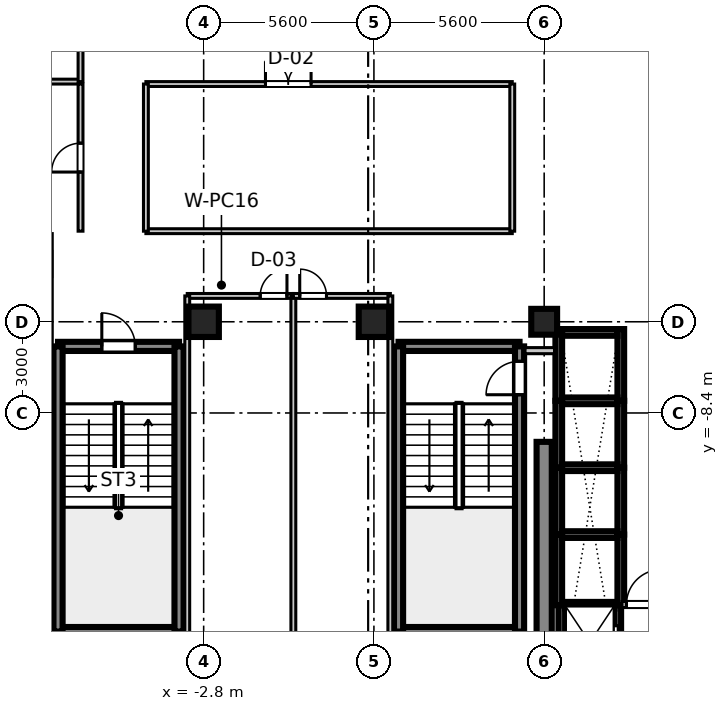
"""IFC4 building model, lengths in metres.
Left out: names, types, materials, properties, quantities, classifications, styles, units other than length and angle.
Written with IfcOpenShell. Run it as: python <this file> out.ifc"""

import sys

from ifc_helpers import new_model, si_unit, direction, frame, frame_2d, origin, origin_2d, place, context, subcontext, project, spatial, rectangle, extrude, source, transform, mapped, element, fill, save


model = new_model("IFC4")
c1 = context("Model", 3, precision=1e-05, world=origin(), true_north=direction((0.0, 1.0)))
c2 = subcontext(c1, "Body", "Model", "MODEL_VIEW")
j1 = project(units=[si_unit("LENGTHUNIT", "METRE"), si_unit("PLANEANGLEUNIT", "RADIAN")], contexts=[c1])
p1 = place(None, origin())
s1 = spatial("IfcSite", under=j1, at=p1, CompositionType="ELEMENT")
p2 = place(p1, origin())
s2 = spatial("IfcBuilding", under=s1, at=p2, CompositionType="ELEMENT")
p3 = place(p2, frame((0.0, 0.0, 249.3)))
s3 = spatial("IfcBuildingStorey", under=s2, at=p3, CompositionType="ELEMENT", Elevation=249.3)
m1 = source(origin(), c2, "Body", "SweptSolid", [
    extrude(rectangle(XDim=1.0, YDim=1.0, at=origin_2d()), origin(), (0.0, 0.0, 1.0), 3.655),
])
for number, where, z_axis, x_axis in (
    (1, (-2.8, -5.4, 0.0), (0.0, 0.0, 1.0), (1.0, 0.0, 0.0)),
    (2, (2.8, -5.4, 0.0), (0.0, 0.0, 1.0), (1.0, 0.0, 0.0)),
):
    element("IfcColumn", number, at=place(p3, frame(where, z_axis=z_axis, x_axis=x_axis)), inside=s3, PredefinedType="COLUMN", context=c2, shape_type="MappedRepresentation", body=[
        mapped(m1, transform((0.0, 0.0, 0.0), scale=1.0)),
    ])
m2 = source(origin(), c2, "Body", "SweptSolid", [
    extrude(rectangle(XDim=0.85, YDim=0.85, at=origin_2d()), origin(), (0.0, 0.0, 1.0), 3.655),
])
p4 = place(p3, frame((8.4, -5.4, 0.0), z_axis=(0.0, 0.0, 1.0), x_axis=(1.0, 0.0, 0.0)))
e3 = element("IfcColumn", 3, at=p4, inside=s3, PredefinedType="PILASTER", context=c2, shape_type="MappedRepresentation", body=[
    mapped(m2, transform((0.0, 0.0, 0.0), scale=1.0)),
])
m3 = source(origin(), c2, "Body", "SweptSolid", [
    extrude(rectangle(XDim=7.65, YDim=0.5, at=frame_2d((3.825, 0.0))), origin(), (0.0, 0.0, 1.0), 3.41),
])
p5 = place(p3, frame((8.4, -17.0, 0.0), z_axis=(0.0, 0.0, 1.0), x_axis=(0.0, 1.0, 0.0)))
e4 = element("IfcWall", 4, at=p5, inside=s3, PredefinedType="SHEAR", context=c2, shape_type="MappedRepresentation", body=[
    mapped(m3, transform((0.0, 0.0, 0.0), scale=1.0)),
])
m4 = source(origin(), c2, "Body", "SweptSolid", [
    extrude(rectangle(XDim=3.98, YDim=0.3, at=frame_2d((1.99, 0.0))), origin(), (0.0, 0.0, 1.0), 3.41),
])
for number, where, z_axis, x_axis in (
    (5, (3.61, -15.59, 0.0), (0.0, 0.0, 1.0), (1.0, 0.0, 0.0)),
    (6, (3.61, -6.21, 0.0), (0.0, 0.0, 1.0), (1.0, 0.0, 0.0)),
):
    element("IfcWall", number, at=place(p3, frame(where, z_axis=z_axis, x_axis=x_axis)), inside=s3, PredefinedType="SHEAR", context=c2, shape_type="MappedRepresentation", body=[
        mapped(m4, transform((0.0, 0.0, 0.0), scale=1.0)),
    ])
m5 = source(origin(), c2, "Body", "SweptSolid", [
    extrude(rectangle(XDim=9.38, YDim=0.3, at=frame_2d((4.69, 0.0))), origin(), (0.0, 0.0, 1.0), 3.41),
])
p6 = place(p3, frame((3.61, -15.59, 0.0), z_axis=(0.0, 0.0, 1.0), x_axis=(0.0, 1.0, 0.0)))
e7 = element("IfcWall", 7, at=p6, inside=s3, PredefinedType="SHEAR", context=c2, shape_type="MappedRepresentation", body=[
    mapped(m5, transform((0.0, 0.0, 0.0), scale=1.0)),
])
p7 = place(p3, frame((7.59, -15.59, 0.0), z_axis=(0.0, 0.0, 1.0), x_axis=(0.0, 1.0, 0.0)))
e8 = element("IfcWall", 8, at=p7, inside=s3, PredefinedType="SHEAR", context=c2, shape_type="MappedRepresentation", body=[
    mapped(m5, transform((0.0, 0.0, 0.0), scale=1.0)),
])
p8 = place(p7, frame((7.79, 0.0, 0.0)))
e9 = element("IfcOpeningElement", 9, at=p8, cuts=e8, PredefinedType="OPENING", context=c2, shape_type="SweptSolid", body=[
    extrude(rectangle(XDim=1.1, YDim=2.15, at=frame_2d((0.55, 1.075))), frame((0.0, 0.16, 0.0), z_axis=(0.0, -1.0, 0.0), x_axis=(1.0, 0.0, 0.0)), (0.0, 0.0, 1.0), 0.32),
])
p9 = place(p3, frame((-7.59, -15.59, 0.0), z_axis=(0.0, 0.0, 1.0), x_axis=(1.0, 0.0, 0.0)))
e10 = element("IfcWall", 10, at=p9, inside=s3, PredefinedType="SHEAR", context=c2, shape_type="MappedRepresentation", body=[
    mapped(m4, transform((0.0, 0.0, 0.0), scale=1.0)),
])
p10 = place(p3, frame((-7.59, -6.21, 0.0), z_axis=(0.0, 0.0, 1.0), x_axis=(1.0, 0.0, 0.0)))
e11 = element("IfcWall", 11, at=p10, inside=s3, PredefinedType="SHEAR", context=c2, shape_type="MappedRepresentation", body=[
    mapped(m4, transform((0.0, 0.0, 0.0), scale=1.0)),
])
p11 = place(p10, frame((1.44, 0.0, 0.0)))
e12 = element("IfcOpeningElement", 12, at=p11, cuts=e11, PredefinedType="OPENING", context=c2, shape_type="SweptSolid", body=[
    extrude(rectangle(XDim=1.1, YDim=2.15, at=frame_2d((0.55, 1.075))), frame((0.0, 0.16, 0.0), z_axis=(0.0, -1.0, 0.0), x_axis=(1.0, 0.0, 0.0)), (0.0, 0.0, 1.0), 0.32),
])
for number, where, z_axis, x_axis in (
    (13, (-7.59, -15.59, 0.0), (0.0, 0.0, 1.0), (0.0, 1.0, 0.0)),
    (14, (-3.61, -15.59, 0.0), (0.0, 0.0, 1.0), (0.0, 1.0, 0.0)),
):
    element("IfcWall", number, at=place(p3, frame(where, z_axis=z_axis, x_axis=x_axis)), inside=s3, PredefinedType="SHEAR", context=c2, shape_type="MappedRepresentation", body=[
        mapped(m5, transform((0.0, 0.0, 0.0), scale=1.0)),
    ])
m6 = source(origin(), c2, "Body", "SweptSolid", [
    extrude(rectangle(XDim=2.36, YDim=0.22, at=frame_2d((1.18, 0.0))), origin(), (0.0, 0.0, 1.0), 3.41),
])
for number, where, z_axis, x_axis in (
    (15, (8.88, -8.0, 0.0), (0.0, 0.0, 1.0), (0.0, 1.0, 0.0)),
    (16, (10.92, -8.0, 0.0), (0.0, 0.0, 1.0), (0.0, 1.0, 0.0)),
):
    element("IfcWall", number, at=place(p3, frame(where, z_axis=z_axis, x_axis=x_axis)), inside=s3, PredefinedType="SHEAR", context=c2, shape_type="MappedRepresentation", body=[
        mapped(m6, transform((0.0, 0.0, 0.0), scale=1.0)),
    ])
m7 = source(origin(), c2, "Body", "SweptSolid", [
    extrude(rectangle(XDim=1.82, YDim=0.22, at=frame_2d((0.91, 0.0))), origin(), (0.0, 0.0, 1.0), 3.41),
])
p12 = place(p3, frame((8.99, -5.75, 0.0), z_axis=(0.0, 0.0, 1.0), x_axis=(1.0, 0.0, 0.0)))
e17 = element("IfcWall", 17, at=p12, inside=s3, PredefinedType="SHEAR", context=c2, shape_type="MappedRepresentation", body=[
    mapped(m7, transform((0.0, 0.0, 0.0), scale=1.0)),
])
m8 = source(origin(), c2, "Body", "SweptSolid", [
    extrude(rectangle(XDim=2.2, YDim=0.22, at=frame_2d((1.1, 0.0))), origin(), (0.0, 0.0, 1.0), 3.41),
])
for number, where, z_axis, x_axis in (
    (18, (8.88, -10.2, 0.0), (0.0, 0.0, 1.0), (0.0, 1.0, 0.0)),
    (19, (10.92, -10.2, 0.0), (0.0, 0.0, 1.0), (0.0, 1.0, 0.0)),
):
    element("IfcWall", number, at=place(p3, frame(where, z_axis=z_axis, x_axis=x_axis)), inside=s3, PredefinedType="SHEAR", context=c2, shape_type="MappedRepresentation", body=[
        mapped(m8, transform((0.0, 0.0, 0.0), scale=1.0)),
    ])
m9 = source(origin(), c2, "Body", "SweptSolid", [
    extrude(rectangle(XDim=1.82, YDim=0.22, at=frame_2d((0.91, 0.0))), origin(), (0.0, 0.0, 1.0), 3.7),
])
p13 = place(p3, frame((8.99, -8.0, 0.0), z_axis=(0.0, 0.0, 1.0), x_axis=(1.0, 0.0, 0.0)))
e20 = element("IfcWall", 20, at=p13, inside=s3, PredefinedType="SHEAR", context=c2, shape_type="MappedRepresentation", body=[
    mapped(m9, transform((0.0, 0.0, 0.0), scale=1.0)),
])
for number, where, z_axis, x_axis in (
    (21, (8.88, -12.4, 0.0), (0.0, 0.0, 1.0), (0.0, 1.0, 0.0)),
    (22, (10.92, -12.4, 0.0), (0.0, 0.0, 1.0), (0.0, 1.0, 0.0)),
):
    element("IfcWall", number, at=place(p3, frame(where, z_axis=z_axis, x_axis=x_axis)), inside=s3, PredefinedType="SHEAR", context=c2, shape_type="MappedRepresentation", body=[
        mapped(m8, transform((0.0, 0.0, 0.0), scale=1.0)),
    ])
p14 = place(p3, frame((8.99, -10.2, 0.0), z_axis=(0.0, 0.0, 1.0), x_axis=(1.0, 0.0, 0.0)))
e23 = element("IfcWall", 23, at=p14, inside=s3, PredefinedType="SHEAR", context=c2, shape_type="MappedRepresentation", body=[
    mapped(m9, transform((0.0, 0.0, 0.0), scale=1.0)),
])
m10 = source(origin(), c2, "Body", "SweptSolid", [
    extrude(rectangle(XDim=2.325, YDim=0.22, at=frame_2d((1.163, 0.0))), origin(), (0.0, 0.0, 1.0), 3.41),
])
for number, where, z_axis, x_axis in (
    (24, (8.88, -14.725, 0.0), (0.0, 0.0, 1.0), (0.0, 1.0, 0.0)),
    (25, (10.92, -14.725, 0.0), (0.0, 0.0, 1.0), (0.0, 1.0, 0.0)),
):
    element("IfcWall", number, at=place(p3, frame(where, z_axis=z_axis, x_axis=x_axis)), inside=s3, PredefinedType="SHEAR", context=c2, shape_type="MappedRepresentation", body=[
        mapped(m10, transform((0.0, 0.0, 0.0), scale=1.0)),
    ])
p15 = place(p3, frame((8.99, -12.4, 0.0), z_axis=(0.0, 0.0, 1.0), x_axis=(1.0, 0.0, 0.0)))
e26 = element("IfcWall", 26, at=p15, inside=s3, PredefinedType="SHEAR", context=c2, shape_type="MappedRepresentation", body=[
    mapped(m9, transform((0.0, 0.0, 0.0), scale=1.0)),
])
m11 = source(origin(), c2, "Body", "SweptSolid", [
    extrude(rectangle(XDim=2.635, YDim=0.22, at=frame_2d((1.317, 0.0))), origin(), (0.0, 0.0, 1.0), 3.41),
])
p16 = place(p3, frame((8.98, -17.36, 0.0), z_axis=(0.0, 0.0, 1.0), x_axis=(0.0, 1.0, 0.0)))
e27 = element("IfcWall", 27, at=p16, inside=s3, PredefinedType="SHEAR", context=c2, shape_type="MappedRepresentation", body=[
    mapped(m11, transform((0.0, 0.0, 0.0), scale=1.0)),
])
p17 = place(p3, frame((10.82, -17.36, 0.0), z_axis=(0.0, 0.0, 1.0), x_axis=(0.0, 1.0, 0.0)))
e28 = element("IfcWall", 28, at=p17, inside=s3, PredefinedType="SHEAR", context=c2, shape_type="MappedRepresentation", body=[
    mapped(m11, transform((0.0, 0.0, 0.0), scale=1.0)),
])
p18 = place(p17, frame((0.86, 0.0, 0.0)))
e29 = element("IfcOpeningElement", 29, at=p18, cuts=e28, PredefinedType="OPENING", context=c2, shape_type="SweptSolid", body=[
    extrude(rectangle(XDim=1.1, YDim=2.2, at=frame_2d((0.55, 1.1))), frame((0.0, 0.12, 0.0), z_axis=(0.0, -1.0, 0.0), x_axis=(1.0, 0.0, 0.0)), (0.0, 0.0, 1.0), 0.24),
])
m12 = source(origin(), c2, "Body", "SweptSolid", [
    extrude(rectangle(XDim=1.62, YDim=0.22, at=frame_2d((0.81, 0.0))), origin(), (0.0, 0.0, 1.0), 3.7),
])
p19 = place(p3, frame((9.09, -14.725, 0.0), z_axis=(0.0, 0.0, 1.0), x_axis=(1.0, 0.0, 0.0)))
e30 = element("IfcWall", 30, at=p19, inside=s3, PredefinedType="SHEAR", context=c2, shape_type="MappedRepresentation", body=[
    mapped(m12, transform((0.0, 0.0, 0.0), scale=1.0)),
])
m13 = source(origin(), c2, "Body", "SweptSolid", [
    extrude(rectangle(XDim=1.46, YDim=0.2, at=frame_2d((0.73, 0.0))), origin(), (0.0, 0.0, 1.0), 2.75),
])
p20 = place(p3, frame((10.96, -14.7, 0.0), z_axis=(0.0, 0.0, 1.0), x_axis=(1.0, 0.0, 0.0)))
e31 = element("IfcWall", 31, at=p20, inside=s3, PredefinedType="PARTITIONING", context=c2, shape_type="MappedRepresentation", body=[
    mapped(m13, transform((0.0, 0.0, 0.0), scale=1.0)),
])
p21 = place(p20, frame((0.145, 0.0, 0.0)))
e32 = element("IfcOpeningElement", 32, at=p21, cuts=e31, PredefinedType="OPENING", context=c2, shape_type="SweptSolid", body=[
    extrude(rectangle(XDim=1.15, YDim=2.15, at=frame_2d((0.575, 1.075))), frame((0.0, 0.11, 0.0), z_axis=(0.0, -1.0, 0.0), x_axis=(1.0, 0.0, 0.0)), (0.0, 0.0, 1.0), 0.22),
])
m14 = source(origin(), c2, "Body", "SweptSolid", [
    extrude(rectangle(XDim=0.97, YDim=0.2, at=frame_2d((0.485, 0.0))), origin(), (0.0, 0.0, 1.0), 2.75),
])
p22 = place(p3, frame((7.77, -6.35, 0.0), z_axis=(0.0, 0.0, 1.0), x_axis=(1.0, 0.0, 0.0)))
e33 = element("IfcWall", 33, at=p22, inside=s3, PredefinedType="PARTITIONING", context=c2, shape_type="MappedRepresentation", body=[
    mapped(m14, transform((0.0, 0.0, 0.0), scale=1.0)),
])
m15 = source(origin(), c2, "Body", "SweptSolid", [
    extrude(rectangle(XDim=14.31, YDim=0.16, at=frame_2d((7.155, 0.0))), origin(), (0.0, 0.0, 1.0), 2.75),
])
p23 = place(p3, frame((-21.16, 2.5, 0.0), z_axis=(0.0, 0.0, 1.0), x_axis=(1.0, 0.0, 0.0)))
e34 = element("IfcWall", 34, at=p23, inside=s3, PredefinedType="PARTITIONING", context=c2, shape_type="MappedRepresentation", body=[
    mapped(m15, transform((0.0, 0.0, 0.0), scale=1.0)),
])
m16 = source(origin(), c2, "Body", "SweptSolid", [
    extrude(rectangle(XDim=10.7, YDim=0.16, at=frame_2d((5.35, 0.0))), origin(), (0.0, 0.0, 1.0), 2.75),
])
p24 = place(p3, frame((-6.85, 2.5, 0.0), z_axis=(0.0, 0.0, 1.0), x_axis=(0.0, 1.0, 0.0)))
e35 = element("IfcWall", 35, at=p24, inside=s3, PredefinedType="PARTITIONING", context=c2, shape_type="MappedRepresentation", body=[
    mapped(m16, transform((0.0, 0.0, 0.0), scale=1.0)),
])
p25 = place(p24, frame((4.91, 0.0, 0.0)))
e36 = element("IfcOpeningElement", 36, at=p25, cuts=e35, PredefinedType="OPENING", context=c2, shape_type="SweptSolid", body=[
    extrude(rectangle(XDim=0.88, YDim=2.1, at=frame_2d((0.44, 1.05))), frame((0.0, 0.09, 0.0), z_axis=(0.0, -1.0, 0.0), x_axis=(1.0, 0.0, 0.0)), (0.0, 0.0, 1.0), 0.18),
])
p26 = place(p3, frame((-7.86, -23.9, 0.0), z_axis=(0.0, 0.0, 1.0), x_axis=(0.0, 1.0, 0.0)))
e37 = element("IfcWall", 37, at=p26, inside=s3, PredefinedType="PARTITIONING", context=c2, shape_type="MappedRepresentation", body=[
    mapped(m16, transform((0.0, 0.0, 0.0), scale=1.0)),
])
p27 = place(p3, frame((-7.86, -13.2, 0.0), z_axis=(0.0, 0.0, 1.0), x_axis=(0.0, 1.0, 0.0)))
e38 = element("IfcWall", 38, at=p27, inside=s3, PredefinedType="PARTITIONING", context=c2, shape_type="MappedRepresentation", body=[
    mapped(m16, transform((0.0, 0.0, 0.0), scale=1.0)),
])
p28 = place(p27, frame((9.26, 0.0, 0.0)))
e39 = element("IfcOpeningElement", 39, at=p28, cuts=e38, PredefinedType="OPENING", context=c2, shape_type="SweptSolid", body=[
    extrude(rectangle(XDim=0.88, YDim=2.1, at=frame_2d((0.44, 1.05))), frame((0.0, 0.09, 0.0), z_axis=(0.0, -1.0, 0.0), x_axis=(1.0, 0.0, 0.0)), (0.0, 0.0, 1.0), 0.18),
])
m17 = source(origin(), c2, "Body", "SweptSolid", [
    extrude(rectangle(XDim=3.49, YDim=0.16, at=frame_2d((1.745, 0.0))), origin(), (0.0, 0.0, 1.0), 2.75),
])
p29 = place(p3, frame((-3.34, -4.55, 0.0), z_axis=(0.0, 0.0, 1.0), x_axis=(1.0, 0.0, 0.0)))
e40 = element("IfcWall", 40, at=p29, inside=s3, PredefinedType="PARTITIONING", context=c2, shape_type="MappedRepresentation", body=[
    mapped(m17, transform((0.0, 0.0, 0.0), scale=1.0)),
])
p30 = place(p29, frame((2.4, 0.0, 0.0)))
e41 = element("IfcOpeningElement", 41, at=p30, cuts=e40, PredefinedType="OPENING", context=c2, shape_type="SweptSolid", body=[
    extrude(rectangle(XDim=0.88, YDim=2.1, at=frame_2d((0.44, 1.05))), frame((0.0, 0.09, 0.0), z_axis=(0.0, -1.0, 0.0), x_axis=(1.0, 0.0, 0.0)), (0.0, 0.0, 1.0), 0.18),
])
m18 = source(origin(), c2, "Body", "SweptSolid", [
    extrude(rectangle(XDim=19.35, YDim=0.16, at=frame_2d((9.675, 0.0))), origin(), (0.0, 0.0, 1.0), 2.75),
])
for number, where, z_axis, x_axis in (
    (42, (-3.34, -23.9, 0.0), (0.0, 0.0, 1.0), (0.0, 1.0, 0.0)),
    (43, (0.15, -23.9, 0.0), (0.0, 0.0, 1.0), (0.0, 1.0, 0.0)),
):
    element("IfcWall", number, at=place(p3, frame(where, z_axis=z_axis, x_axis=x_axis)), inside=s3, PredefinedType="PARTITIONING", context=c2, shape_type="MappedRepresentation", body=[
        mapped(m18, transform((0.0, 0.0, 0.0), scale=1.0)),
    ])
m19 = source(origin(), c2, "Body", "SweptSolid", [
    extrude(rectangle(XDim=3.19, YDim=0.16, at=frame_2d((1.595, 0.0))), origin(), (0.0, 0.0, 1.0), 2.75),
])
p31 = place(p3, frame((0.15, -4.55, 0.0), z_axis=(0.0, 0.0, 1.0), x_axis=(1.0, 0.0, 0.0)))
e44 = element("IfcWall", 44, at=p31, inside=s3, PredefinedType="PARTITIONING", context=c2, shape_type="MappedRepresentation", body=[
    mapped(m19, transform((0.0, 0.0, 0.0), scale=1.0)),
])
p32 = place(p31, frame((0.21, 0.0, 0.0)))
e45 = element("IfcOpeningElement", 45, at=p32, cuts=e44, PredefinedType="OPENING", context=c2, shape_type="SweptSolid", body=[
    extrude(rectangle(XDim=0.88, YDim=2.1, at=frame_2d((0.44, 1.05))), frame((0.0, 0.09, 0.0), z_axis=(0.0, -1.0, 0.0), x_axis=(1.0, 0.0, 0.0)), (0.0, 0.0, 1.0), 0.18),
])
p33 = place(p3, frame((3.34, -23.9, 0.0), z_axis=(0.0, 0.0, 1.0), x_axis=(0.0, 1.0, 0.0)))
e46 = element("IfcWall", 46, at=p33, inside=s3, PredefinedType="PARTITIONING", context=c2, shape_type="MappedRepresentation", body=[
    mapped(m18, transform((0.0, 0.0, 0.0), scale=1.0)),
])
m20 = source(origin(), c2, "Body", "SweptSolid", [
    extrude(rectangle(XDim=4.84, YDim=0.16, at=frame_2d((2.42, 0.0))), origin(), (0.0, 0.0, 1.0), 2.75),
])
p34 = place(p3, frame((-6.85, -2.42, 0.0), z_axis=(0.0, 0.0, 1.0), x_axis=(0.0, 1.0, 0.0)))
e47 = element("IfcWall", 47, at=p34, inside=s3, PredefinedType="PARTITIONING", context=c2, shape_type="MappedRepresentation", body=[
    mapped(m20, transform((0.0, 0.0, 0.0), scale=1.0)),
])
p35 = place(p34, frame((1.945, 0.0, 0.0)))
e48 = element("IfcOpeningElement", 48, at=p35, cuts=e47, PredefinedType="OPENING", context=c2, shape_type="SweptSolid", body=[
    extrude(rectangle(XDim=0.95, YDim=2.1, at=frame_2d((0.475, 1.05))), frame((0.0, 0.09, 0.0), z_axis=(0.0, -1.0, 0.0), x_axis=(1.0, 0.0, 0.0)), (0.0, 0.0, 1.0), 0.18),
])
m21 = source(origin(), c2, "Body", "SweptSolid", [
    extrude(rectangle(XDim=12.05, YDim=0.16, at=frame_2d((6.025, 0.0))), origin(), (0.0, 0.0, 1.0), 2.75),
])
p36 = place(p3, frame((-4.7, -2.42, 0.0), z_axis=(0.0, 0.0, 1.0), x_axis=(1.0, 0.0, 0.0)))
e49 = element("IfcWall", 49, at=p36, inside=s3, PredefinedType="PARTITIONING", context=c2, shape_type="MappedRepresentation", body=[
    mapped(m21, transform((0.0, 0.0, 0.0), scale=1.0)),
])
p37 = place(p3, frame((-4.7, 2.42, 0.0), z_axis=(0.0, 0.0, 1.0), x_axis=(1.0, 0.0, 0.0)))
e50 = element("IfcWall", 50, at=p37, inside=s3, PredefinedType="PARTITIONING", context=c2, shape_type="MappedRepresentation", body=[
    mapped(m21, transform((0.0, 0.0, 0.0), scale=1.0)),
])
p38 = place(p37, frame((3.933, 0.0, 0.0)))
e51 = element("IfcOpeningElement", 51, at=p38, cuts=e50, PredefinedType="OPENING", context=c2, shape_type="SweptSolid", body=[
    extrude(rectangle(XDim=1.5, YDim=2.15, at=frame_2d((0.75, 1.075))), frame((0.0, 0.09, 0.0), z_axis=(0.0, -1.0, 0.0), x_axis=(1.0, 0.0, 0.0)), (0.0, 0.0, 1.0), 0.18),
])
for number, where, z_axis, x_axis in (
    (52, (-4.7, -2.42, 0.0), (0.0, 0.0, 1.0), (0.0, 1.0, 0.0)),
    (53, (7.35, -2.42, 0.0), (0.0, 0.0, 1.0), (0.0, 1.0, 0.0)),
):
    element("IfcWall", number, at=place(p3, frame(where, z_axis=z_axis, x_axis=x_axis)), inside=s3, PredefinedType="PARTITIONING", context=c2, shape_type="MappedRepresentation", body=[
        mapped(m20, transform((0.0, 0.0, 0.0), scale=1.0)),
    ])
m22 = source(origin(), c2, "Body", "SweptSolid", [
    extrude(rectangle(XDim=1.1, YDim=2.15, at=frame_2d((0.55, 1.075))), frame((0.0, 0.025, 0.0), z_axis=(0.0, -1.0, 0.0), x_axis=(1.0, 0.0, 0.0)), (0.0, 0.0, 1.0), 0.05),
])
p39 = place(p8, origin())
e54 = element("IfcDoor", 54, at=p39, inside=s3, OperationType="SINGLE_SWING_LEFT", PredefinedType="DOOR", context=c2, shape_type="MappedRepresentation", body=[
    mapped(m22, transform((0.0, 0.0, 0.0), scale=1.0)),
])
fill(e9, e54)
p40 = place(p11, frame((1.1, 0.0, 0.0), z_axis=(0.0, 0.0, 1.0), x_axis=(-1.0, 0.0, 0.0)))
e55 = element("IfcDoor", 55, at=p40, inside=s3, OperationType="SINGLE_SWING_LEFT", PredefinedType="DOOR", context=c2, shape_type="MappedRepresentation", body=[
    mapped(m22, transform((0.0, 0.0, 0.0), scale=1.0)),
])
fill(e12, e55)
m23 = source(origin(), c2, "Body", "SweptSolid", [
    extrude(rectangle(XDim=1.1, YDim=2.2, at=frame_2d((0.55, 1.1))), frame((0.0, 0.025, 0.0), z_axis=(0.0, -1.0, 0.0), x_axis=(1.0, 0.0, 0.0)), (0.0, 0.0, 1.0), 0.05),
])
p41 = place(p18, frame((1.1, 0.0, 0.0), z_axis=(0.0, 0.0, 1.0), x_axis=(-1.0, 0.0, 0.0)))
e56 = element("IfcDoor", 56, at=p41, inside=s3, OperationType="DOUBLE_DOOR_SLIDING", PredefinedType="DOOR", context=c2, shape_type="MappedRepresentation", body=[
    mapped(m23, transform((0.0, 0.0, 0.0), scale=1.0)),
])
fill(e29, e56)
m24 = source(origin(), c2, "Body", "SweptSolid", [
    extrude(rectangle(XDim=1.15, YDim=2.15, at=frame_2d((0.575, 1.075))), frame((0.0, 0.025, 0.0), z_axis=(0.0, -1.0, 0.0), x_axis=(1.0, 0.0, 0.0)), (0.0, 0.0, 1.0), 0.05),
])
p42 = place(p21, origin())
e57 = element("IfcDoor", 57, at=p42, inside=s3, OperationType="SINGLE_SWING_RIGHT", PredefinedType="DOOR", context=c2, shape_type="MappedRepresentation", body=[
    mapped(m24, transform((0.0, 0.0, 0.0), scale=1.0)),
])
fill(e32, e57)
m25 = source(origin(), c2, "Body", "SweptSolid", [
    extrude(rectangle(XDim=0.88, YDim=2.1, at=frame_2d((0.44, 1.05))), frame((0.0, 0.025, 0.0), z_axis=(0.0, -1.0, 0.0), x_axis=(1.0, 0.0, 0.0)), (0.0, 0.0, 1.0), 0.05),
])
p43 = place(p30, frame((0.88, 0.0, 0.0), z_axis=(0.0, 0.0, 1.0), x_axis=(-1.0, 0.0, 0.0)))
e58 = element("IfcDoor", 58, at=p43, inside=s3, OperationType="SINGLE_SWING_RIGHT", PredefinedType="DOOR", context=c2, shape_type="MappedRepresentation", body=[
    mapped(m25, transform((0.0, 0.0, 0.0), scale=1.0)),
])
fill(e41, e58)
p44 = place(p32, frame((0.88, 0.0, 0.0), z_axis=(0.0, 0.0, 1.0), x_axis=(-1.0, 0.0, 0.0)))
e59 = element("IfcDoor", 59, at=p44, inside=s3, OperationType="SINGLE_SWING_LEFT", PredefinedType="DOOR", context=c2, shape_type="MappedRepresentation", body=[
    mapped(m25, transform((0.0, 0.0, 0.0), scale=1.0)),
])
fill(e45, e59)
m26 = source(origin(), c2, "Body", "SweptSolid", [
    extrude(rectangle(XDim=0.95, YDim=2.1, at=frame_2d((0.475, 1.05))), frame((0.0, 0.025, 0.0), z_axis=(0.0, -1.0, 0.0), x_axis=(1.0, 0.0, 0.0)), (0.0, 0.0, 1.0), 0.05),
])
p45 = place(p35, origin())
e60 = element("IfcDoor", 60, at=p45, inside=s3, OperationType="SINGLE_SWING_LEFT", PredefinedType="DOOR", context=c2, shape_type="MappedRepresentation", body=[
    mapped(m26, transform((0.0, 0.0, 0.0), scale=1.0)),
])
fill(e48, e60)
m27 = source(origin(), c2, "Body", "SweptSolid", [
    extrude(rectangle(XDim=1.5, YDim=2.15, at=frame_2d((0.75, 1.075))), frame((0.0, 0.025, 0.0), z_axis=(0.0, -1.0, 0.0), x_axis=(1.0, 0.0, 0.0)), (0.0, 0.0, 1.0), 0.05),
])
p46 = place(p38, frame((1.5, 0.0, 0.0), z_axis=(0.0, 0.0, 1.0), x_axis=(-1.0, 0.0, 0.0)))
e61 = element("IfcDoor", 61, at=p46, inside=s3, OperationType="DOUBLE_DOOR_SINGLE_SWING", PredefinedType="DOOR", context=c2, shape_type="MappedRepresentation", body=[
    mapped(m27, transform((0.0, 0.0, 0.0), scale=1.0)),
])
fill(e51, e61)
save(model, sys.argv[1])
